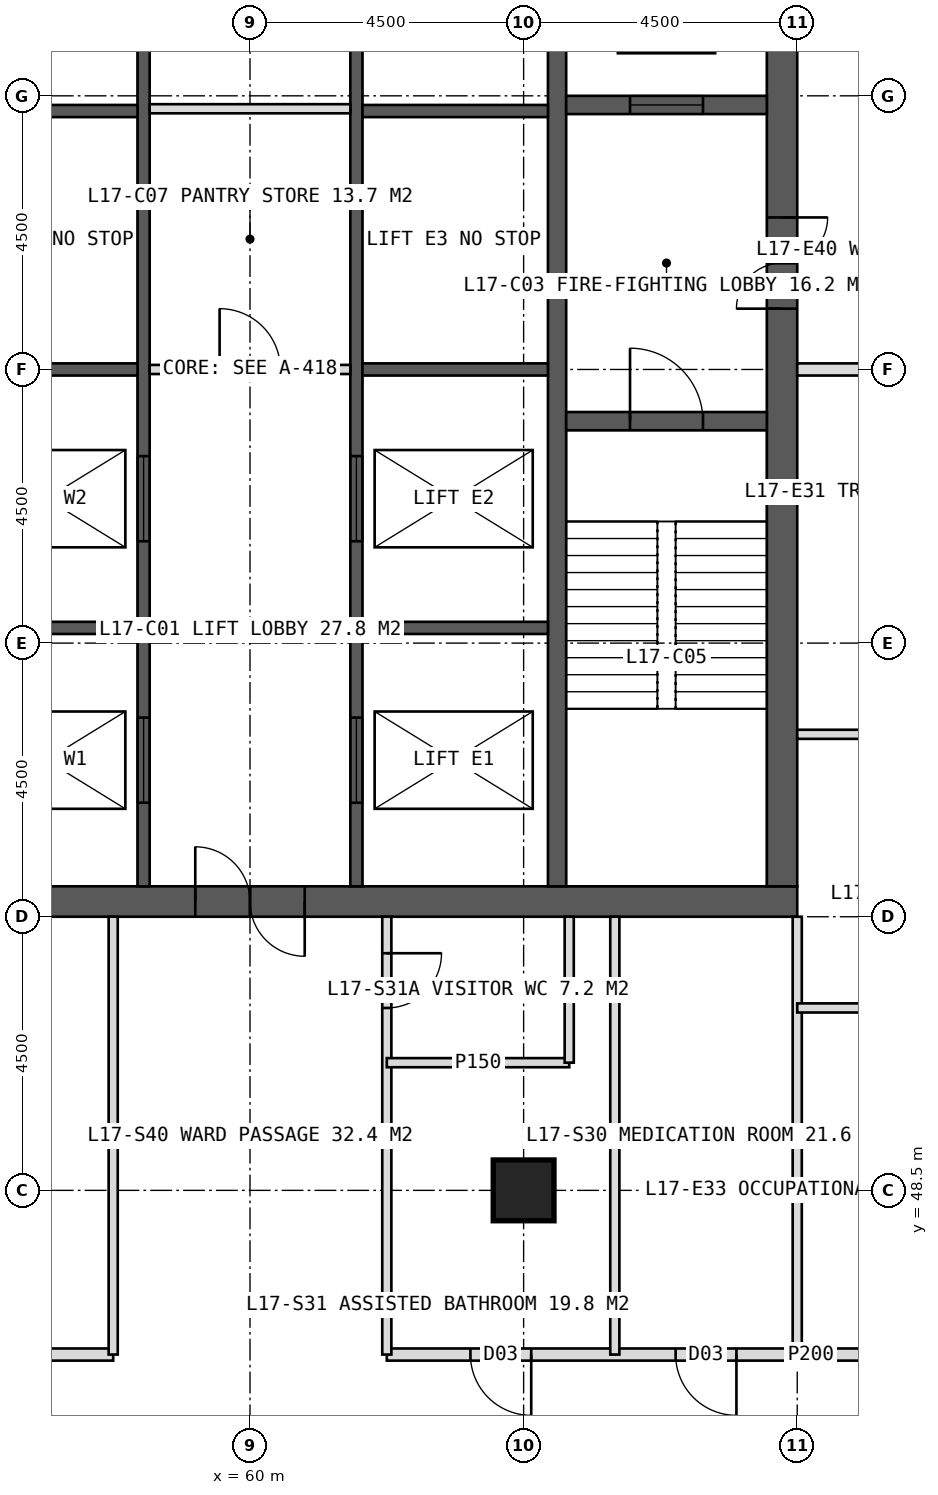
"""IFC4 building model, lengths in metres.
Left out: names, types, materials, properties, quantities, classifications, styles, units other than length and angle.
Written with IfcOpenShell. Run it as: python <this file> out.ifc"""

import sys

from ifc_helpers import new_model, si_unit, direction, frame, frame_2d, origin, origin_2d, place, context, subcontext, project, spatial, rectangle, hollow_rectangle, extrude, element, fill, save


model = new_model("IFC4")
c1 = context("Model", 3, precision=1e-05, world=origin(), true_north=direction((0.0, 1.0)))
c2 = subcontext(c1, "Body", "Model", "MODEL_VIEW")
j1 = project(units=[si_unit("LENGTHUNIT", "METRE"), si_unit("PLANEANGLEUNIT", "RADIAN")], contexts=[c1])
p1 = place(None, origin())
s1 = spatial("IfcSite", under=j1, at=p1, CompositionType="ELEMENT")
p2 = place(p1, origin())
s2 = spatial("IfcBuilding", under=s1, at=p2, CompositionType="ELEMENT")
p3 = place(p2, frame((0.0, 0.0, 75.0)))
s3 = spatial("IfcBuildingStorey", under=s2, at=p3, CompositionType="ELEMENT", Elevation=75.0)
p4 = place(p3, frame((51.0, 53.25, 0.0), z_axis=(0.0, 0.0, 1.0), x_axis=(1.0, 0.0, 0.0)))
e1 = element("IfcWall", 1, at=p4, inside=s3, PredefinedType="SHEAR", context=c2, shape_type="SweptSolid", body=[
    extrude(rectangle(XDim=18.0, YDim=0.5, at=frame_2d((9.0, 0.0))), origin(), (0.0, 0.0, 1.0), 4.0),
])
p5 = place(p4, frame((8.1, 0.0, 0.0)))
e2 = element("IfcOpeningElement", 2, at=p5, cuts=e1, PredefinedType="OPENING", context=c2, shape_type="SweptSolid", body=[
    extrude(rectangle(XDim=1.8, YDim=2.2, at=frame_2d((0.9, 1.1))), frame((0.0, 0.26, 0.0), z_axis=(0.0, -1.0, 0.0), x_axis=(1.0, 0.0, 0.0)), (0.0, 0.0, 1.0), 0.52),
])
p6 = place(p3, frame((68.75, 53.5, 0.0), z_axis=(0.0, 0.0, 1.0), x_axis=(0.0, 1.0, 0.0)))
e3 = element("IfcWall", 3, at=p6, inside=s3, PredefinedType="SHEAR", context=c2, shape_type="SweptSolid", body=[
    extrude(rectangle(XDim=17.0, YDim=0.5, at=frame_2d((8.5, 0.0))), origin(), (0.0, 0.0, 1.0), 4.0),
])
p7 = place(p6, frame((9.5, 0.0, 0.0)))
e4 = element("IfcOpeningElement", 4, at=p7, cuts=e3, PredefinedType="OPENING", context=c2, shape_type="SweptSolid", body=[
    extrude(rectangle(XDim=1.5, YDim=2.2, at=frame_2d((0.75, 1.1))), frame((0.0, 0.26, 0.0), z_axis=(0.0, -1.0, 0.0), x_axis=(1.0, 0.0, 0.0)), (0.0, 0.0, 1.0), 0.52),
])
p8 = place(p3, frame((65.05, 53.5, 0.0), z_axis=(0.0, 0.0, 1.0), x_axis=(0.0, 1.0, 0.0)))
e5 = element("IfcWall", 5, at=p8, inside=s3, PredefinedType="SHEAR", context=c2, shape_type="SweptSolid", body=[
    extrude(rectangle(XDim=17.0, YDim=0.3, at=frame_2d((8.5, 0.0))), origin(), (0.0, 0.0, 1.0), 4.0),
])
p9 = place(p3, frame((58.25, 53.5, 0.0), z_axis=(0.0, 0.0, 1.0), x_axis=(0.0, 1.0, 0.0)))
e6 = element("IfcWall", 6, at=p9, inside=s3, PredefinedType="SHEAR", context=c2, shape_type="SweptSolid", body=[
    extrude(rectangle(XDim=17.0, YDim=0.2, at=frame_2d((8.5, 0.0))), origin(), (0.0, 0.0, 1.0), 4.0),
])
p10 = place(p9, frame((1.375, 0.0, 0.0)))
e7 = element("IfcOpeningElement", 7, at=p10, cuts=e6, PredefinedType="OPENING", context=c2, shape_type="SweptSolid", body=[
    extrude(rectangle(XDim=1.4, YDim=2.2, at=frame_2d((0.7, 1.1))), frame((0.0, 0.11, 0.0), z_axis=(0.0, -1.0, 0.0), x_axis=(1.0, 0.0, 0.0)), (0.0, 0.0, 1.0), 0.22),
])
p11 = place(p9, frame((5.675, 0.0, 0.0)))
e8 = element("IfcOpeningElement", 8, at=p11, cuts=e6, PredefinedType="OPENING", context=c2, shape_type="SweptSolid", body=[
    extrude(rectangle(XDim=1.4, YDim=2.2, at=frame_2d((0.7, 1.1))), frame((0.0, 0.11, 0.0), z_axis=(0.0, -1.0, 0.0), x_axis=(1.0, 0.0, 0.0)), (0.0, 0.0, 1.0), 0.22),
])
p12 = place(p3, frame((61.75, 53.5, 0.0), z_axis=(0.0, 0.0, 1.0), x_axis=(0.0, 1.0, 0.0)))
e9 = element("IfcWall", 9, at=p12, inside=s3, PredefinedType="SHEAR", context=c2, shape_type="SweptSolid", body=[
    extrude(rectangle(XDim=17.0, YDim=0.2, at=frame_2d((8.5, 0.0))), origin(), (0.0, 0.0, 1.0), 4.0),
])
p13 = place(p12, frame((1.375, 0.0, 0.0)))
e10 = element("IfcOpeningElement", 10, at=p13, cuts=e9, PredefinedType="OPENING", context=c2, shape_type="SweptSolid", body=[
    extrude(rectangle(XDim=1.4, YDim=2.2, at=frame_2d((0.7, 1.1))), frame((0.0, 0.11, 0.0), z_axis=(0.0, -1.0, 0.0), x_axis=(1.0, 0.0, 0.0)), (0.0, 0.0, 1.0), 0.22),
])
p14 = place(p12, frame((5.675, 0.0, 0.0)))
e11 = element("IfcOpeningElement", 11, at=p14, cuts=e9, PredefinedType="OPENING", context=c2, shape_type="SweptSolid", body=[
    extrude(rectangle(XDim=1.4, YDim=2.2, at=frame_2d((0.7, 1.1))), frame((0.0, 0.11, 0.0), z_axis=(0.0, -1.0, 0.0), x_axis=(1.0, 0.0, 0.0)), (0.0, 0.0, 1.0), 0.22),
])
for number, where, z_axis, x_axis in (
    (12, (55.1, 57.75, 0.0), (0.0, 0.0, 1.0), (1.0, 0.0, 0.0)),
    (13, (61.85, 57.75, 0.0), (0.0, 0.0, 1.0), (1.0, 0.0, 0.0)),
    (14, (55.1, 62.0, 0.0), (0.0, 0.0, 1.0), (1.0, 0.0, 0.0)),
    (15, (61.85, 62.0, 0.0), (0.0, 0.0, 1.0), (1.0, 0.0, 0.0)),
    (16, (55.1, 66.25, 0.0), (0.0, 0.0, 1.0), (1.0, 0.0, 0.0)),
    (17, (61.85, 66.25, 0.0), (0.0, 0.0, 1.0), (1.0, 0.0, 0.0)),
):
    element("IfcWall", number, at=place(p3, frame(where, z_axis=z_axis, x_axis=x_axis)), inside=s3, PredefinedType="SHEAR", context=c2, shape_type="SweptSolid", body=[
        extrude(rectangle(XDim=3.05, YDim=0.2, at=frame_2d((1.525, 0.0))), origin(), (0.0, 0.0, 1.0), 4.0),
    ])
p15 = place(p3, frame((65.2, 61.15, 0.0), z_axis=(0.0, 0.0, 1.0), x_axis=(1.0, 0.0, 0.0)))
e18 = element("IfcWall", 18, at=p15, inside=s3, PredefinedType="SHEAR", context=c2, shape_type="SweptSolid", body=[
    extrude(rectangle(XDim=3.3, YDim=0.3, at=frame_2d((1.65, 0.0))), origin(), (0.0, 0.0, 1.0), 4.0),
])
p16 = place(p15, frame((1.05, 0.0, 0.0)))
e19 = element("IfcOpeningElement", 19, at=p16, cuts=e18, PredefinedType="OPENING", context=c2, shape_type="SweptSolid", body=[
    extrude(rectangle(XDim=1.2, YDim=2.1, at=frame_2d((0.6, 1.05))), frame((0.0, 0.16, 0.0), z_axis=(0.0, -1.0, 0.0), x_axis=(1.0, 0.0, 0.0)), (0.0, 0.0, 1.0), 0.32),
])
p17 = place(p3, frame((65.2, 66.35, 0.0), z_axis=(0.0, 0.0, 1.0), x_axis=(1.0, 0.0, 0.0)))
e20 = element("IfcWall", 20, at=p17, inside=s3, PredefinedType="SHEAR", context=c2, shape_type="SweptSolid", body=[
    extrude(rectangle(XDim=3.3, YDim=0.3, at=frame_2d((1.65, 0.0))), origin(), (0.0, 0.0, 1.0), 4.0),
])
p18 = place(p17, frame((1.05, 0.0, 0.0)))
e21 = element("IfcOpeningElement", 21, at=p18, cuts=e20, PredefinedType="OPENING", context=c2, shape_type="SweptSolid", body=[
    extrude(rectangle(XDim=1.2, YDim=2.2, at=frame_2d((0.6, 1.1))), frame((0.0, 0.16, 0.0), z_axis=(0.0, -1.0, 0.0), x_axis=(1.0, 0.0, 0.0)), (0.0, 0.0, 1.0), 0.32),
])
p19 = place(p3, frame((64.5, 48.5, 0.0), z_axis=(0.0, 0.0, 1.0), x_axis=(1.0, 0.0, 0.0)))
e22 = element("IfcColumn", 22, at=p19, inside=s3, PredefinedType="COLUMN", context=c2, shape_type="SweptSolid", body=[
    extrude(hollow_rectangle(XDim=1.0, YDim=1.0, WallThickness=0.1, at=origin_2d()), origin(), (0.0, 0.0, 1.0), 4.0),
])
p20 = place(p3, frame((69.0, 53.0, 0.0), z_axis=(0.0, 0.0, 1.0), x_axis=(0.0, -1.0, 0.0)))
e23 = element("IfcWall", 23, at=p20, inside=s3, PredefinedType="PARTITIONING", context=c2, shape_type="SweptSolid", body=[
    extrude(rectangle(XDim=7.2, YDim=0.15, at=frame_2d((3.6, 0.0))), origin(), (0.0, 0.0, 1.0), 3.75),
])
p21 = place(p3, frame((76.2, 45.8, 0.0), z_axis=(0.0, 0.0, 1.0), x_axis=(-1.0, 0.0, 0.0)))
e24 = element("IfcWall", 24, at=p21, inside=s3, PredefinedType="PARTITIONING", context=c2, shape_type="SweptSolid", body=[
    extrude(rectangle(XDim=13.95, YDim=0.2, at=frame_2d((6.975, 0.0))), origin(), (0.0, 0.0, 1.0), 3.75),
])
p22 = place(p21, frame((8.2, 0.0, 0.0)))
e25 = element("IfcOpeningElement", 25, at=p22, cuts=e24, PredefinedType="OPENING", context=c2, shape_type="SweptSolid", body=[
    extrude(rectangle(XDim=1.0, YDim=2.1, at=frame_2d((0.5, 1.05))), frame((0.0, 0.11, 0.0), z_axis=(0.0, -1.0, 0.0), x_axis=(1.0, 0.0, 0.0)), (0.0, 0.0, 1.0), 0.22),
])
p23 = place(p21, frame((11.575, 0.0, 0.0)))
e26 = element("IfcOpeningElement", 26, at=p23, cuts=e24, PredefinedType="OPENING", context=c2, shape_type="SweptSolid", body=[
    extrude(rectangle(XDim=1.0, YDim=2.1, at=frame_2d((0.5, 1.05))), frame((0.0, 0.11, 0.0), z_axis=(0.0, -1.0, 0.0), x_axis=(1.0, 0.0, 0.0)), (0.0, 0.0, 1.0), 0.22),
])
p24 = place(p3, frame((57.75, 45.8, 0.0), z_axis=(0.0, 0.0, 1.0), x_axis=(-1.0, 0.0, 0.0)))
e27 = element("IfcWall", 27, at=p24, inside=s3, PredefinedType="PARTITIONING", context=c2, shape_type="SweptSolid", body=[
    extrude(rectangle(XDim=13.95, YDim=0.2, at=frame_2d((6.975, 0.0))), origin(), (0.0, 0.0, 1.0), 3.75),
])
p25 = place(p24, frame((3.625, 0.0, 0.0)))
e28 = element("IfcOpeningElement", 28, at=p25, cuts=e27, PredefinedType="OPENING", context=c2, shape_type="SweptSolid", body=[
    extrude(rectangle(XDim=1.0, YDim=2.1, at=frame_2d((0.5, 1.05))), frame((0.0, 0.11, 0.0), z_axis=(0.0, -1.0, 0.0), x_axis=(1.0, 0.0, 0.0)), (0.0, 0.0, 1.0), 0.22),
])
p26 = place(p24, frame((10.6, 0.0, 0.0)))
e29 = element("IfcOpeningElement", 29, at=p26, cuts=e27, PredefinedType="OPENING", context=c2, shape_type="SweptSolid", body=[
    extrude(rectangle(XDim=1.0, YDim=2.1, at=frame_2d((0.5, 1.05))), frame((0.0, 0.11, 0.0), z_axis=(0.0, -1.0, 0.0), x_axis=(1.0, 0.0, 0.0)), (0.0, 0.0, 1.0), 0.22),
])
p27 = place(p3, frame((62.25, 53.0, 0.0), z_axis=(0.0, 0.0, 1.0), x_axis=(0.0, -1.0, 0.0)))
e30 = element("IfcWall", 30, at=p27, inside=s3, PredefinedType="PARTITIONING", context=c2, shape_type="SweptSolid", body=[
    extrude(rectangle(XDim=7.2, YDim=0.15, at=frame_2d((3.6, 0.0))), origin(), (0.0, 0.0, 1.0), 3.75),
])
p28 = place(p27, frame((0.6, 0.0, 0.0)))
e31 = element("IfcOpeningElement", 31, at=p28, cuts=e30, PredefinedType="OPENING", context=c2, shape_type="SweptSolid", body=[
    extrude(rectangle(XDim=0.9, YDim=2.1, at=frame_2d((0.45, 1.05))), frame((0.0, 0.085, 0.0), z_axis=(0.0, -1.0, 0.0), x_axis=(1.0, 0.0, 0.0)), (0.0, 0.0, 1.0), 0.17),
])
for number, where, z_axis, x_axis in (
    (32, (57.75, 53.0, 0.0), (0.0, 0.0, 1.0), (0.0, -1.0, 0.0)),
    (33, (66.0, 53.0, 0.0), (0.0, 0.0, 1.0), (0.0, -1.0, 0.0)),
):
    element("IfcWall", number, at=place(p3, frame(where, z_axis=z_axis, x_axis=x_axis)), inside=s3, PredefinedType="PARTITIONING", context=c2, shape_type="SweptSolid", body=[
        extrude(rectangle(XDim=7.2, YDim=0.15, at=frame_2d((3.6, 0.0))), origin(), (0.0, 0.0, 1.0), 3.75),
    ])
p29 = place(p3, frame((65.25, 50.6, 0.0), z_axis=(0.0, 0.0, 1.0), x_axis=(-1.0, 0.0, 0.0)))
e34 = element("IfcWall", 34, at=p29, inside=s3, PredefinedType="PARTITIONING", context=c2, shape_type="SweptSolid", body=[
    extrude(rectangle(XDim=3.0, YDim=0.15, at=frame_2d((1.5, 0.0))), origin(), (0.0, 0.0, 1.0), 3.75),
])
p30 = place(p3, frame((65.25, 53.0, 0.0), z_axis=(0.0, 0.0, 1.0), x_axis=(0.0, -1.0, 0.0)))
e35 = element("IfcWall", 35, at=p30, inside=s3, PredefinedType="PARTITIONING", context=c2, shape_type="SweptSolid", body=[
    extrude(rectangle(XDim=2.4, YDim=0.15, at=frame_2d((1.2, 0.0))), origin(), (0.0, 0.0, 1.0), 3.75),
])
p31 = place(p3, frame((69.0, 62.0, 0.0), z_axis=(0.0, 0.0, 1.0), x_axis=(1.0, 0.0, 0.0)))
e36 = element("IfcWall", 36, at=p31, inside=s3, PredefinedType="SOLIDWALL", context=c2, shape_type="SweptSolid", body=[
    extrude(rectangle(XDim=7.2, YDim=0.2, at=frame_2d((3.6, 0.0))), origin(), (0.0, 0.0, 1.0), 2.75),
])
for number, where, z_axis, x_axis in (
    (37, (69.0, 56.0, 0.0), (0.0, 0.0, 1.0), (1.0, 0.0, 0.0)),
    (38, (69.0, 51.5, 0.0), (0.0, 0.0, 1.0), (1.0, 0.0, 0.0)),
):
    element("IfcWall", number, at=place(p3, frame(where, z_axis=z_axis, x_axis=x_axis)), inside=s3, PredefinedType="PARTITIONING", context=c2, shape_type="SweptSolid", body=[
        extrude(rectangle(XDim=7.2, YDim=0.15, at=frame_2d((3.6, 0.0))), origin(), (0.0, 0.0, 1.0), 3.75),
    ])
p32 = place(p3, frame((58.35, 62.0, 0.0), z_axis=(0.0, 0.0, 1.0), x_axis=(1.0, 0.0, 0.0)))
e39 = element("IfcWall", 39, at=p32, inside=s3, PredefinedType="PARTITIONING", context=c2, shape_type="SweptSolid", body=[
    extrude(rectangle(XDim=3.3, YDim=0.15, at=frame_2d((1.65, 0.0))), origin(), (0.0, 0.0, 1.0), 3.75),
])
p33 = place(p32, frame((1.15, 0.0, 0.0)))
e40 = element("IfcOpeningElement", 40, at=p33, cuts=e39, PredefinedType="OPENING", context=c2, shape_type="SweptSolid", body=[
    extrude(rectangle(XDim=1.0, YDim=2.1, at=frame_2d((0.5, 1.05))), frame((0.0, 0.085, 0.0), z_axis=(0.0, -1.0, 0.0), x_axis=(1.0, 0.0, 0.0)), (0.0, 0.0, 1.0), 0.17),
])
p34 = place(p3, frame((58.35, 66.288, 0.0), z_axis=(0.0, 0.0, 1.0), x_axis=(1.0, 0.0, 0.0)))
e41 = element("IfcWall", 41, at=p34, inside=s3, PredefinedType="PARTITIONING", context=c2, shape_type="SweptSolid", body=[
    extrude(rectangle(XDim=3.3, YDim=0.15, at=frame_2d((1.65, 0.0))), origin(), (0.0, 0.0, 1.0), 3.75),
])
p35 = place(p22, origin())
e42 = element("IfcDoor", 42, at=p35, inside=s3, OperationType="SINGLE_SWING_LEFT", PredefinedType="DOOR", context=c2, shape_type="SweptSolid", body=[
    extrude(rectangle(XDim=1.0, YDim=2.1, at=frame_2d((0.5, 1.05))), frame((0.0, 0.025, 0.0), z_axis=(0.0, -1.0, 0.0), x_axis=(1.0, 0.0, 0.0)), (0.0, 0.0, 1.0), 0.05),
])
fill(e25, e42)
p36 = place(p28, origin())
e43 = element("IfcDoor", 43, at=p36, inside=s3, OperationType="SINGLE_SWING_LEFT", PredefinedType="DOOR", context=c2, shape_type="SweptSolid", body=[
    extrude(rectangle(XDim=0.9, YDim=2.1, at=frame_2d((0.45, 1.05))), frame((0.0, 0.025, 0.0), z_axis=(0.0, -1.0, 0.0), x_axis=(1.0, 0.0, 0.0)), (0.0, 0.0, 1.0), 0.05),
])
fill(e31, e43)
p37 = place(p23, origin())
e44 = element("IfcDoor", 44, at=p37, inside=s3, OperationType="SINGLE_SWING_LEFT", PredefinedType="DOOR", context=c2, shape_type="SweptSolid", body=[
    extrude(rectangle(XDim=1.0, YDim=2.1, at=frame_2d((0.5, 1.05))), frame((0.0, 0.025, 0.0), z_axis=(0.0, -1.0, 0.0), x_axis=(1.0, 0.0, 0.0)), (0.0, 0.0, 1.0), 0.05),
])
fill(e26, e44)
p38 = place(p5, origin())
e45 = element("IfcDoor", 45, at=p38, inside=s3, OperationType="DOUBLE_DOOR_SINGLE_SWING", PredefinedType="DOOR", context=c2, shape_type="SweptSolid", body=[
    extrude(rectangle(XDim=1.8, YDim=2.2, at=frame_2d((0.9, 1.1))), frame((0.0, 0.025, 0.0), z_axis=(0.0, -1.0, 0.0), x_axis=(1.0, 0.0, 0.0)), (0.0, 0.0, 1.0), 0.05),
])
fill(e2, e45)
p39 = place(p7, origin())
e46 = element("IfcDoor", 46, at=p39, inside=s3, OperationType="DOUBLE_DOOR_SINGLE_SWING", PredefinedType="DOOR", context=c2, shape_type="SweptSolid", body=[
    extrude(rectangle(XDim=1.5, YDim=2.2, at=frame_2d((0.75, 1.1))), frame((0.0, 0.025, 0.0), z_axis=(0.0, -1.0, 0.0), x_axis=(1.0, 0.0, 0.0)), (0.0, 0.0, 1.0), 0.05),
])
fill(e4, e46)
p40 = place(p16, origin())
e47 = element("IfcDoor", 47, at=p40, inside=s3, OperationType="SINGLE_SWING_LEFT", PredefinedType="DOOR", context=c2, shape_type="SweptSolid", body=[
    extrude(rectangle(XDim=1.2, YDim=2.1, at=frame_2d((0.6, 1.05))), frame((0.0, 0.025, 0.0), z_axis=(0.0, -1.0, 0.0), x_axis=(1.0, 0.0, 0.0)), (0.0, 0.0, 1.0), 0.05),
])
fill(e19, e47)
p41 = place(p18, origin())
e48 = element("IfcDoor", 48, at=p41, inside=s3, OperationType="SLIDING_TO_LEFT", PredefinedType="DOOR", context=c2, shape_type="SweptSolid", body=[
    extrude(rectangle(XDim=1.2, YDim=2.2, at=frame_2d((0.6, 1.1))), frame((0.0, 0.025, 0.0), z_axis=(0.0, -1.0, 0.0), x_axis=(1.0, 0.0, 0.0)), (0.0, 0.0, 1.0), 0.05),
])
fill(e21, e48)
p42 = place(p10, origin())
e49 = element("IfcDoor", 49, at=p42, inside=s3, OperationType="SLIDING_TO_LEFT", PredefinedType="DOOR", context=c2, shape_type="SweptSolid", body=[
    extrude(rectangle(XDim=1.4, YDim=2.2, at=frame_2d((0.7, 1.1))), frame((0.0, 0.025, 0.0), z_axis=(0.0, -1.0, 0.0), x_axis=(1.0, 0.0, 0.0)), (0.0, 0.0, 1.0), 0.05),
])
fill(e7, e49)
p43 = place(p13, origin())
e50 = element("IfcDoor", 50, at=p43, inside=s3, OperationType="SLIDING_TO_LEFT", PredefinedType="DOOR", context=c2, shape_type="SweptSolid", body=[
    extrude(rectangle(XDim=1.4, YDim=2.2, at=frame_2d((0.7, 1.1))), frame((0.0, 0.025, 0.0), z_axis=(0.0, -1.0, 0.0), x_axis=(1.0, 0.0, 0.0)), (0.0, 0.0, 1.0), 0.05),
])
fill(e10, e50)
p44 = place(p11, origin())
e51 = element("IfcDoor", 51, at=p44, inside=s3, OperationType="SLIDING_TO_LEFT", PredefinedType="DOOR", context=c2, shape_type="SweptSolid", body=[
    extrude(rectangle(XDim=1.4, YDim=2.2, at=frame_2d((0.7, 1.1))), frame((0.0, 0.025, 0.0), z_axis=(0.0, -1.0, 0.0), x_axis=(1.0, 0.0, 0.0)), (0.0, 0.0, 1.0), 0.05),
])
fill(e8, e51)
p45 = place(p14, origin())
e52 = element("IfcDoor", 52, at=p45, inside=s3, OperationType="SLIDING_TO_LEFT", PredefinedType="DOOR", context=c2, shape_type="SweptSolid", body=[
    extrude(rectangle(XDim=1.4, YDim=2.2, at=frame_2d((0.7, 1.1))), frame((0.0, 0.025, 0.0), z_axis=(0.0, -1.0, 0.0), x_axis=(1.0, 0.0, 0.0)), (0.0, 0.0, 1.0), 0.05),
])
fill(e11, e52)
p46 = place(p33, origin())
e53 = element("IfcDoor", 53, at=p46, inside=s3, OperationType="SINGLE_SWING_LEFT", PredefinedType="DOOR", context=c2, shape_type="SweptSolid", body=[
    extrude(rectangle(XDim=1.0, YDim=2.1, at=frame_2d((0.5, 1.05))), frame((0.0, 0.025, 0.0), z_axis=(0.0, -1.0, 0.0), x_axis=(1.0, 0.0, 0.0)), (0.0, 0.0, 1.0), 0.05),
])
fill(e40, e53)
save(model, sys.argv[1])
